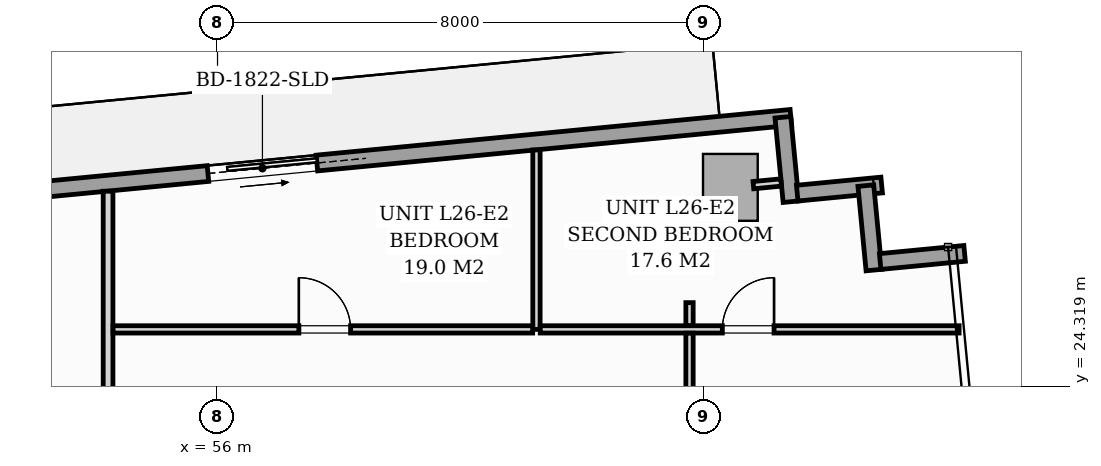
"""IFC4 building model, lengths in metres.
Left out: names, types, materials, properties, quantities, classifications, styles, units other than length and angle.
Written with IfcOpenShell. Run it as: python <this file> out.ifc"""

import sys

from ifc_helpers import new_model, si_unit, direction, frame, frame_2d, origin, origin_2d, place, context, subcontext, project, spatial, rectangle, extrude, source, transform, mapped, element, fill, save


model = new_model("IFC4")
c1 = context("Model", 3, precision=1e-05, world=origin(), true_north=direction((0.0, 1.0)))
c2 = subcontext(c1, "Body", "Model", "MODEL_VIEW")
j1 = project(units=[si_unit("LENGTHUNIT", "METRE"), si_unit("PLANEANGLEUNIT", "RADIAN")], contexts=[c1])
p1 = place(None, origin())
s1 = spatial("IfcSite", under=j1, at=p1, CompositionType="ELEMENT")
p2 = place(p1, origin())
s2 = spatial("IfcBuilding", under=s1, at=p2, CompositionType="ELEMENT")
p3 = place(p2, frame((0.0, 0.0, 93.8)))
s3 = spatial("IfcBuildingStorey", under=s2, at=p3, CompositionType="ELEMENT", Elevation=93.8)
m1 = source(origin(), c2, "Body", "SweptSolid", [
    extrude(rectangle(XDim=0.9, YDim=1.1, at=origin_2d()), origin(), (0.0, 0.0, 1.0), 3.196),
])
p4 = place(p3, frame((64.434, 27.591, 0.002), z_axis=(0.0, 0.0, 1.0), x_axis=(0.995396198367, 0.09584575252, 0.0)))
e1 = element("IfcColumn", 1, at=p4, inside=s3, PredefinedType="COLUMN", context=c2, shape_type="MappedRepresentation", body=[
    mapped(m1, transform((0.0, 0.0, 0.0), scale=1.0)),
])
p5 = place(p3, frame((46.406, 26.91, 0.0), z_axis=(0.0, 0.0, 1.0), x_axis=(0.995396638587, 0.095841180552, 0.0)))
e2 = element("IfcWall", 2, at=p5, inside=s3, PredefinedType="STANDARD", context=c2, shape_type="SweptSolid", body=[
    extrude(rectangle(XDim=19.11, YDim=0.26, at=frame_2d((9.555, 0.0))), origin(), (0.0, 0.0, 1.0), 2.94),
])
p6 = place(p5, frame((9.48, 0.0, 0.0)))
e3 = element("IfcOpeningElement", 3, at=p6, cuts=e2, PredefinedType="OPENING", context=c2, shape_type="SweptSolid", body=[
    extrude(rectangle(XDim=1.8, YDim=2.06, at=frame_2d((0.9, 1.03))), frame((0.0, 0.14, 0.0), z_axis=(0.0, -1.0, 0.0), x_axis=(1.0, 0.0, 0.0)), (0.0, 0.0, 1.0), 0.28),
])
p7 = place(p5, frame((0.7, 0.0, 0.65)))
e4 = element("IfcOpeningElement", 4, at=p7, cuts=e2, PredefinedType="OPENING", context=c2, shape_type="SweptSolid", body=[
    extrude(rectangle(XDim=1.6, YDim=1.5, at=frame_2d((0.8, 0.75))), frame((0.0, 0.14, 0.0), z_axis=(0.0, -1.0, 0.0), x_axis=(1.0, 0.0, 0.0)), (0.0, 0.0, 1.0), 0.28),
])
for number, where, z_axis, x_axis in (
    (5, (65.298, 28.744, 0.0), (0.0, 0.0, 1.0), (0.096, -0.995, 0.0)),
    (6, (65.533, 27.496, 0.0), (0.0, 0.0, 1.0), (0.995, 0.096, 0.0)),
):
    element("IfcWall", number, at=place(p3, frame(where, z_axis=z_axis, x_axis=x_axis)), inside=s3, PredefinedType="STANDARD", context=c2, shape_type="SweptSolid", body=[
        extrude(rectangle(XDim=1.395, YDim=0.26, at=frame_2d((0.698, 0.0))), origin(), (0.0, 0.0, 1.0), 2.94),
    ])
p8 = place(p3, frame((66.662, 27.619, 0.0), z_axis=(0.0, 0.0, 1.0), x_axis=(0.095742423056, -0.99540614245, 0.0)))
e7 = element("IfcWall", 7, at=p8, inside=s3, PredefinedType="STANDARD", context=c2, shape_type="SweptSolid", body=[
    extrude(rectangle(XDim=1.395, YDim=0.26, at=frame_2d((0.697, 0.0))), origin(), (0.0, 0.0, 1.0), 2.94),
])
p9 = place(p3, frame((66.897, 26.371, 0.0), z_axis=(0.0, 0.0, 1.0), x_axis=(0.995391056452, 0.09589913835, 0.0)))
e8 = element("IfcWall", 8, at=p9, inside=s3, PredefinedType="STANDARD", context=c2, shape_type="SweptSolid", body=[
    extrude(rectangle(XDim=1.395, YDim=0.26, at=frame_2d((0.698, 0.0))), origin(), (0.0, 0.0, 1.0), 2.94),
])
p10 = place(p3, frame((54.2, 12.712, 0.0), z_axis=(0.0, 0.0, 1.0), x_axis=(0.0, 1.0, 0.0)))
e9 = element("IfcWall", 9, at=p10, inside=s3, PredefinedType="PARTITIONING", context=c2, shape_type="SweptSolid", body=[
    extrude(rectangle(XDim=14.815, YDim=0.16, at=frame_2d((7.408, 0.0))), origin(), (0.0, 0.0, 1.0), 2.94),
])
p11 = place(p10, frame((0.493, 0.0, 0.0)))
e10 = element("IfcOpeningElement", 10, at=p11, cuts=e9, PredefinedType="OPENING", context=c2, shape_type="SweptSolid", body=[
    extrude(rectangle(XDim=0.95, YDim=2.06, at=frame_2d((0.475, 1.03))), frame((0.0, 0.09, 0.0), z_axis=(0.0, -1.0, 0.0), x_axis=(1.0, 0.0, 0.0)), (0.0, 0.0, 1.0), 0.18),
])
p12 = place(p10, frame((5.433, 0.0, 0.0)))
e11 = element("IfcOpeningElement", 11, at=p12, cuts=e9, PredefinedType="OPENING", context=c2, shape_type="SweptSolid", body=[
    extrude(rectangle(XDim=0.85, YDim=2.0, at=frame_2d((0.425, 1.0))), frame((0.0, 0.09, 0.0), z_axis=(0.0, -1.0, 0.0), x_axis=(1.0, 0.0, 0.0)), (0.0, 0.0, 1.0), 0.18),
])
p13 = place(p3, frame((61.245, 25.255, 0.0), z_axis=(0.0, 0.0, 1.0), x_axis=(0.0, 1.0, 0.0)))
e12 = element("IfcWall", 12, at=p13, inside=s3, PredefinedType="PARTITIONING", context=c2, shape_type="SweptSolid", body=[
    extrude(rectangle(XDim=2.951, YDim=0.12, at=frame_2d((1.476, 0.0))), origin(), (0.0, 0.0, 1.0), 2.94),
])
p14 = place(p3, frame((54.282, 25.255, 0.0), z_axis=(0.0, 0.0, 1.0), x_axis=(1.0, 0.0, 0.0)))
e13 = element("IfcWall", 13, at=p14, inside=s3, PredefinedType="PARTITIONING", context=c2, shape_type="SweptSolid", body=[
    extrude(rectangle(XDim=6.901, YDim=0.12, at=frame_2d((3.451, 0.0))), origin(), (0.0, 0.0, 1.0), 2.94),
])
p15 = place(p14, frame((3.056, 0.0, 0.0)))
e14 = element("IfcOpeningElement", 14, at=p15, cuts=e13, PredefinedType="OPENING", context=c2, shape_type="SweptSolid", body=[
    extrude(rectangle(XDim=0.85, YDim=2.05, at=frame_2d((0.425, 1.025))), frame((0.0, 0.07, 0.0), z_axis=(0.0, -1.0, 0.0), x_axis=(1.0, 0.0, 0.0)), (0.0, 0.0, 1.0), 0.14),
])
p16 = place(p3, frame((61.307, 25.255, 0.0), z_axis=(0.0, 0.0, 1.0), x_axis=(1.0, 0.0, 0.0)))
e15 = element("IfcWall", 15, at=p16, inside=s3, PredefinedType="PARTITIONING", context=c2, shape_type="SweptSolid", body=[
    extrude(rectangle(XDim=6.888, YDim=0.12, at=frame_2d((3.444, 0.0))), origin(), (0.0, 0.0, 1.0), 2.94),
])
p17 = place(p16, frame((2.995, 0.0, 0.0)))
e16 = element("IfcOpeningElement", 16, at=p17, cuts=e15, PredefinedType="OPENING", context=c2, shape_type="SweptSolid", body=[
    extrude(rectangle(XDim=0.85, YDim=2.05, at=frame_2d((0.425, 1.025))), frame((0.0, 0.07, 0.0), z_axis=(0.0, -1.0, 0.0), x_axis=(1.0, 0.0, 0.0)), (0.0, 0.0, 1.0), 0.14),
])
p18 = place(p3, frame((63.762, 17.652, 0.0), z_axis=(0.0, 0.0, 1.0), x_axis=(0.0, 1.0, 0.0)))
e17 = element("IfcWall", 17, at=p18, inside=s3, PredefinedType="PARTITIONING", context=c2, shape_type="SweptSolid", body=[
    extrude(rectangle(XDim=7.541, YDim=0.12, at=frame_2d((3.771, 0.0))), origin(), (0.0, 0.0, 1.0), 2.94),
])
p19 = place(p18, frame((3.345, 0.0, 0.0)))
e18 = element("IfcOpeningElement", 18, at=p19, cuts=e17, PredefinedType="OPENING", context=c2, shape_type="SweptSolid", body=[
    extrude(rectangle(XDim=0.85, YDim=2.05, at=frame_2d((0.425, 1.025))), frame((0.0, 0.07, 0.0), z_axis=(0.0, -1.0, 0.0), x_axis=(1.0, 0.0, 0.0)), (0.0, 0.0, 1.0), 0.14),
])
p20 = place(p3, frame((63.762, 25.317, 0.0), z_axis=(0.0, 0.0, 1.0), x_axis=(0.0, 1.0, 0.0)))
e19 = element("IfcWall", 19, at=p20, inside=s3, PredefinedType="PARTITIONING", context=c2, shape_type="SweptSolid", body=[
    extrude(rectangle(XDim=0.378, YDim=0.12, at=frame_2d((0.189, 0.0))), origin(), (0.0, 0.0, 1.0), 2.94),
])
p21 = place(p3, frame((64.812, 27.627, 0.0), z_axis=(0.0, 0.0, 1.0), x_axis=(0.995389482415, 0.095915474751, 0.0)))
e20 = element("IfcWall", 20, at=p21, inside=s3, PredefinedType="PARTITIONING", context=c2, shape_type="SweptSolid", body=[
    extrude(rectangle(XDim=0.458, YDim=0.12, at=frame_2d((0.229, 0.0))), origin(), (0.0, 0.0, 1.0), 2.94),
])
m2 = source(origin(), c2, "Body", "SweptSolid", [
    extrude(rectangle(XDim=1.8, YDim=2.06, at=frame_2d((0.9, 1.03))), frame((0.0, 0.025, 0.0), z_axis=(0.0, -1.0, 0.0), x_axis=(1.0, 0.0, 0.0)), (0.0, 0.0, 1.0), 0.05),
])
p22 = place(p6, origin())
e21 = element("IfcDoor", 21, at=p22, inside=s3, OperationType="SLIDING_TO_RIGHT", PredefinedType="DOOR", context=c2, shape_type="MappedRepresentation", body=[
    mapped(m2, transform((0.0, 0.0, 0.0), scale=1.0)),
])
fill(e3, e21)
m3 = source(origin(), c2, "Body", "SweptSolid", [
    extrude(rectangle(XDim=0.85, YDim=2.05, at=frame_2d((0.425, 1.025))), frame((0.0, 0.025, 0.0), z_axis=(0.0, -1.0, 0.0), x_axis=(1.0, 0.0, 0.0)), (0.0, 0.0, 1.0), 0.05),
])
p23 = place(p15, origin())
e22 = element("IfcDoor", 22, at=p23, inside=s3, OperationType="SINGLE_SWING_LEFT", PredefinedType="DOOR", context=c2, shape_type="MappedRepresentation", body=[
    mapped(m3, transform((0.0, 0.0, 0.0), scale=1.0)),
])
fill(e14, e22)
p24 = place(p17, origin())
e23 = element("IfcDoor", 23, at=p24, inside=s3, OperationType="SINGLE_SWING_RIGHT", PredefinedType="DOOR", context=c2, shape_type="MappedRepresentation", body=[
    mapped(m3, transform((0.0, 0.0, 0.0), scale=1.0)),
])
fill(e16, e23)
save(model, sys.argv[1])
